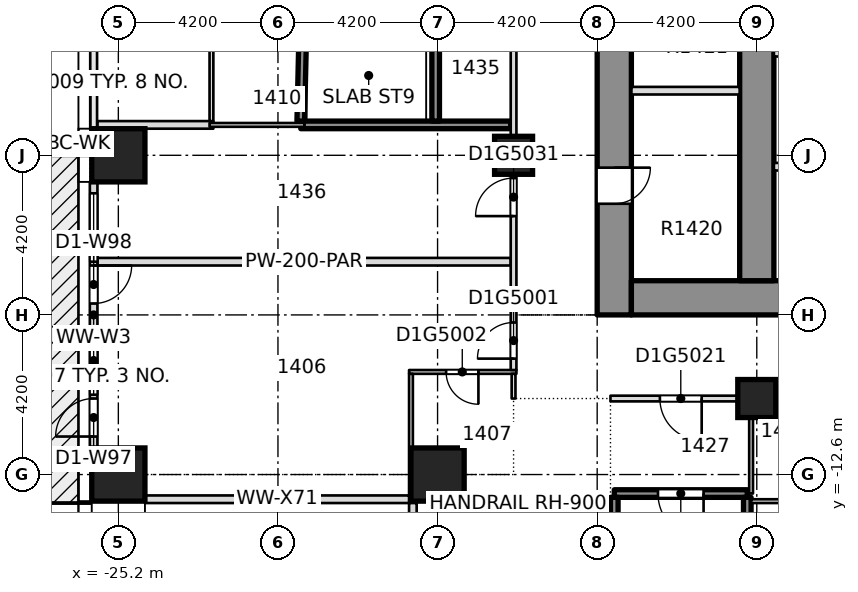
"""IFC4 building model, lengths in metres.
Left out: names, types, materials, properties, quantities, classifications, styles, units other than length and angle.
Written with IfcOpenShell. Run it as: python <this file> out.ifc"""

import sys

from ifc_helpers import new_model, si_unit, direction, frame, frame_2d, origin, origin_2d, place, context, subcontext, project, spatial, rectangle, extrude, element, fill, save


model = new_model("IFC4")
c1 = context("Model", 3, precision=1e-05, world=origin(), true_north=direction((0.0, 1.0)))
c2 = subcontext(c1, "Body", "Model", "MODEL_VIEW")
j1 = project(units=[si_unit("LENGTHUNIT", "METRE"), si_unit("PLANEANGLEUNIT", "RADIAN")], contexts=[c1])
p1 = place(None, origin())
s1 = spatial("IfcSite", under=j1, at=p1, CompositionType="ELEMENT")
p2 = place(p1, origin())
s2 = spatial("IfcBuilding", under=s1, at=p2, CompositionType="ELEMENT")
p3 = place(p2, frame((0.0, 0.0, 62.1)))
s3 = spatial("IfcBuildingStorey", under=s2, at=p3, CompositionType="ELEMENT", Elevation=62.1)
p4 = place(p3, frame((-12.15, -8.4, -0.32), z_axis=(0.0, 0.0, 1.0), x_axis=(0.0, 1.0, 0.0)))
e1 = element("IfcWall", 1, at=p4, inside=s3, PredefinedType="SHEAR", context=c2, shape_type="SweptSolid", body=[
    extrude(rectangle(XDim=30.15, YDim=0.9, at=frame_2d((15.075, 0.0))), origin(), (0.0, 0.0, 1.0), 3.45),
])
p5 = place(p4, frame((2.925, 0.0, 0.32)))
e2 = element("IfcOpeningElement", 2, at=p5, cuts=e1, PredefinedType="OPENING", context=c2, shape_type="SweptSolid", body=[
    extrude(rectangle(XDim=0.95, YDim=2.1, at=frame_2d((0.475, 1.05))), frame((0.0, 0.46, 0.0), z_axis=(0.0, -1.0, 0.0), x_axis=(1.0, 0.0, 0.0)), (0.0, 0.0, 1.0), 0.92),
])
p6 = place(p4, frame((7.025, 0.0, 0.32)))
e3 = element("IfcOpeningElement", 3, at=p6, cuts=e1, PredefinedType="OPENING", context=c2, shape_type="SweptSolid", body=[
    extrude(rectangle(XDim=0.95, YDim=2.1, at=frame_2d((0.475, 1.05))), frame((0.0, 0.46, 0.0), z_axis=(0.0, -1.0, 0.0), x_axis=(1.0, 0.0, 0.0)), (0.0, 0.0, 1.0), 0.92),
])
p7 = place(p4, frame((10.875, 0.0, 0.32)))
e4 = element("IfcOpeningElement", 4, at=p7, cuts=e1, PredefinedType="OPENING", context=c2, shape_type="SweptSolid", body=[
    extrude(rectangle(XDim=0.95, YDim=2.1, at=frame_2d((0.475, 1.05))), frame((0.0, 0.46, 0.0), z_axis=(0.0, -1.0, 0.0), x_axis=(1.0, 0.0, 0.0)), (0.0, 0.0, 1.0), 0.92),
])
p8 = place(p4, frame((15.625, 0.0, 0.32)))
e5 = element("IfcOpeningElement", 5, at=p8, cuts=e1, PredefinedType="OPENING", context=c2, shape_type="SweptSolid", body=[
    extrude(rectangle(XDim=0.95, YDim=2.1, at=frame_2d((0.475, 1.05))), frame((0.0, 0.46, 0.0), z_axis=(0.0, -1.0, 0.0), x_axis=(1.0, 0.0, 0.0)), (0.0, 0.0, 1.0), 0.92),
])
p9 = place(p4, frame((24.75, 0.0, 0.32)))
e6 = element("IfcOpeningElement", 6, at=p9, cuts=e1, PredefinedType="OPENING", context=c2, shape_type="SweptSolid", body=[
    extrude(rectangle(XDim=0.95, YDim=2.1, at=frame_2d((0.475, 1.05))), frame((0.0, 0.46, 0.0), z_axis=(0.0, -1.0, 0.0), x_axis=(1.0, 0.0, 0.0)), (0.0, 0.0, 1.0), 0.92),
])
p10 = place(p4, frame((19.3, 0.0, 0.32)))
e7 = element("IfcOpeningElement", 7, at=p10, cuts=e1, PredefinedType="OPENING", context=c2, shape_type="SweptSolid", body=[
    extrude(rectangle(XDim=1.2, YDim=2.1, at=frame_2d((0.6, 1.05))), frame((0.0, 0.46, 0.0), z_axis=(0.0, -1.0, 0.0), x_axis=(1.0, 0.0, 0.0)), (0.0, 0.0, 1.0), 0.92),
])
p11 = place(p3, frame((-11.7, -7.95, -0.32), z_axis=(0.0, 0.0, 1.0), x_axis=(1.0, 0.0, 0.0)))
e8 = element("IfcWall", 8, at=p11, inside=s3, PredefinedType="SHEAR", context=c2, shape_type="SweptSolid", body=[
    extrude(rectangle(XDim=23.4, YDim=0.9, at=frame_2d((11.7, 0.0))), origin(), (0.0, 0.0, 1.0), 3.45),
])
p12 = place(p11, frame((6.95, 0.0, 0.32)))
e9 = element("IfcOpeningElement", 9, at=p12, cuts=e8, PredefinedType="OPENING", context=c2, shape_type="SweptSolid", body=[
    extrude(rectangle(XDim=1.8, YDim=2.1, at=frame_2d((0.9, 1.05))), frame((0.0, 0.46, 0.0), z_axis=(0.0, -1.0, 0.0), x_axis=(1.0, 0.0, 0.0)), (0.0, 0.0, 1.0), 0.92),
])
p13 = place(p11, frame((14.65, 0.0, 0.32)))
e10 = element("IfcOpeningElement", 10, at=p13, cuts=e8, PredefinedType="OPENING", context=c2, shape_type="SweptSolid", body=[
    extrude(rectangle(XDim=1.8, YDim=2.1, at=frame_2d((0.9, 1.05))), frame((0.0, 0.46, 0.0), z_axis=(0.0, -1.0, 0.0), x_axis=(1.0, 0.0, 0.0)), (0.0, 0.0, 1.0), 0.92),
])
p14 = place(p3, frame((-8.4, -7.5, -0.32), z_axis=(0.0, 0.0, 1.0), x_axis=(0.0, 1.0, 0.0)))
e11 = element("IfcWall", 11, at=p14, inside=s3, PredefinedType="SHEAR", context=c2, shape_type="SweptSolid", body=[
    extrude(rectangle(XDim=28.35, YDim=0.9, at=frame_2d((14.175, 0.0))), origin(), (0.0, 0.0, 1.0), 3.45),
])
p15 = place(p14, frame((18.4, 0.0, 0.32)))
e12 = element("IfcOpeningElement", 12, at=p15, cuts=e11, PredefinedType="OPENING", context=c2, shape_type="SweptSolid", body=[
    extrude(rectangle(XDim=1.2, YDim=2.1, at=frame_2d((0.6, 1.05))), frame((0.0, 0.46, 0.0), z_axis=(0.0, -1.0, 0.0), x_axis=(1.0, 0.0, 0.0)), (0.0, 0.0, 1.0), 0.92),
])
for number, where, z_axis, x_axis in (
    (13, (-25.2, -12.6, -0.32), (0.0, 0.0, 1.0), (1.0, 0.0, 0.0)),
    (14, (-16.8, -12.6, -0.32), (0.0, 0.0, 1.0), (1.0, 0.0, 0.0)),
    (15, (-25.2, -4.2, -0.32), (0.0, 0.0, 1.0), (1.0, 0.0, 0.0)),
):
    element("IfcColumn", number, at=place(p3, frame(where, z_axis=z_axis, x_axis=x_axis)), inside=s3, PredefinedType="COLUMN", context=c2, shape_type="SweptSolid", body=[
        extrude(rectangle(XDim=1.4, YDim=1.4, at=origin_2d()), origin(), (0.0, 0.0, 1.0), 3.45),
    ])
for number, where, z_axis, x_axis in (
    (16, (-8.4, -10.6, -0.32), (0.0, 0.0, 1.0), (1.0, 0.0, 0.0)),
    (17, (-14.8, -4.2, -0.32), (0.0, 0.0, 1.0), (1.0, 0.0, 0.0)),
):
    element("IfcColumn", number, at=place(p3, frame(where, z_axis=z_axis, x_axis=x_axis)), inside=s3, PredefinedType="COLUMN", context=c2, shape_type="SweptSolid", body=[
        extrude(rectangle(XDim=1.0, YDim=1.0, at=origin_2d()), origin(), (0.0, 0.0, 1.0), 3.45),
    ])
p16 = place(p3, frame((-8.55, -13.3, 0.0), z_axis=(0.0, 0.0, 1.0), x_axis=(1.0, 0.0, 0.0)))
e18 = element("IfcWall", 18, at=p16, inside=s3, PredefinedType="PARTITIONING", context=c2, shape_type="SweptSolid", body=[
    extrude(rectangle(XDim=2.45, YDim=0.1, at=frame_2d((1.225, 0.0))), origin(), (0.0, 0.0, 1.0), 3.13),
])
p17 = place(p16, frame((1.35, 0.0, 0.0)))
e19 = element("IfcOpeningElement", 19, at=p17, cuts=e18, PredefinedType="OPENING", context=c2, shape_type="SweptSolid", body=[
    extrude(rectangle(XDim=0.85, YDim=2.1, at=frame_2d((0.425, 1.05))), frame((0.0, 0.06, 0.0), z_axis=(0.0, -1.0, 0.0), x_axis=(1.0, 0.0, 0.0)), (0.0, 0.0, 1.0), 0.12),
])
p18 = place(p3, frame((-12.15, -13.1, 0.0), z_axis=(0.0, 0.0, 1.0), x_axis=(1.0, 0.0, 0.0)))
e20 = element("IfcWall", 20, at=p18, inside=s3, PredefinedType="SOLIDWALL", context=c2, shape_type="SweptSolid", body=[
    extrude(rectangle(XDim=3.5, YDim=0.2, at=frame_2d((1.75, 0.0))), origin(), (0.0, 0.0, 1.0), 3.13),
])
p19 = place(p18, frame((1.15, 0.0, 0.0)))
e21 = element("IfcOpeningElement", 21, at=p19, cuts=e20, PredefinedType="OPENING", context=c2, shape_type="SweptSolid", body=[
    extrude(rectangle(XDim=1.2, YDim=2.1, at=frame_2d((0.6, 1.05))), frame((0.0, 0.11, 0.0), z_axis=(0.0, -1.0, 0.0), x_axis=(1.0, 0.0, 0.0)), (0.0, 0.0, 1.0), 0.22),
])
p20 = place(p3, frame((-12.25, -10.6, 0.0), z_axis=(0.0, 0.0, 1.0), x_axis=(1.0, 0.0, 0.0)))
e22 = element("IfcWall", 22, at=p20, inside=s3, PredefinedType="PARTITIONING", context=c2, shape_type="SweptSolid", body=[
    extrude(rectangle(XDim=3.75, YDim=0.15, at=frame_2d((1.875, 0.0))), origin(), (0.0, 0.0, 1.0), 3.13),
])
p21 = place(p20, frame((1.3, 0.0, 0.0)))
e23 = element("IfcOpeningElement", 23, at=p21, cuts=e22, PredefinedType="OPENING", context=c2, shape_type="SweptSolid", body=[
    extrude(rectangle(XDim=1.1, YDim=2.1, at=frame_2d((0.55, 1.05))), frame((0.0, 0.085, 0.0), z_axis=(0.0, -1.0, 0.0), x_axis=(1.0, 0.0, 0.0)), (0.0, 0.0, 1.0), 0.17),
])
p22 = place(p3, frame((-8.6, -10.6, 0.0), z_axis=(0.0, 0.0, 1.0), x_axis=(1.0, 0.0, 0.0)))
e24 = element("IfcWall", 24, at=p22, inside=s3, PredefinedType="PARTITIONING", context=c2, shape_type="SweptSolid", body=[
    extrude(rectangle(XDim=2.5, YDim=0.1, at=frame_2d((1.25, 0.0))), origin(), (0.0, 0.0, 1.0), 3.13),
])
p23 = place(p3, frame((-17.55, -9.9, 0.0), z_axis=(0.0, 0.0, 1.0), x_axis=(1.0, 0.0, 0.0)))
e25 = element("IfcWall", 25, at=p23, inside=s3, PredefinedType="PARTITIONING", context=c2, shape_type="SweptSolid", body=[
    extrude(rectangle(XDim=2.825, YDim=0.1, at=frame_2d((1.413, 0.0))), origin(), (0.0, 0.0, 1.0), 3.13),
])
p24 = place(p23, frame((0.975, 0.0, 0.0)))
e26 = element("IfcOpeningElement", 26, at=p24, cuts=e25, PredefinedType="OPENING", context=c2, shape_type="SweptSolid", body=[
    extrude(rectangle(XDim=0.85, YDim=2.1, at=frame_2d((0.425, 1.05))), frame((0.0, 0.06, 0.0), z_axis=(0.0, -1.0, 0.0), x_axis=(1.0, 0.0, 0.0)), (0.0, 0.0, 1.0), 0.12),
])
p25 = place(p3, frame((-25.75, -7.0, 0.0), z_axis=(0.0, 0.0, 1.0), x_axis=(1.0, 0.0, 0.0)))
e27 = element("IfcWall", 27, at=p25, inside=s3, PredefinedType="PARTITIONING", context=c2, shape_type="SweptSolid", body=[
    extrude(rectangle(XDim=10.875, YDim=0.2, at=frame_2d((5.438, 0.0))), origin(), (0.0, 0.0, 1.0), 3.13),
])
p26 = place(p3, frame((-25.75, -3.4, 0.0), z_axis=(0.0, 0.0, 1.0), x_axis=(1.0, 0.0, 0.0)))
e28 = element("IfcWall", 28, at=p26, inside=s3, PredefinedType="PARTITIONING", context=c2, shape_type="SweptSolid", body=[
    extrude(rectangle(XDim=3.05, YDim=0.2, at=frame_2d((1.525, 0.0))), origin(), (0.0, 0.0, 1.0), 3.13),
])
p27 = place(p3, frame((-22.8, -3.4, 0.0), z_axis=(0.0, 0.0, 1.0), x_axis=(1.0, 0.0, 0.0)))
e29 = element("IfcWall", 29, at=p27, inside=s3, PredefinedType="PARTITIONING", context=c2, shape_type="SweptSolid", body=[
    extrude(rectangle(XDim=2.5, YDim=0.1, at=frame_2d((1.25, 0.0))), origin(), (0.0, 0.0, 1.0), 3.13),
])
p28 = place(p3, frame((-20.4, -3.4, 0.0), z_axis=(0.0, 0.0, 1.0), x_axis=(1.0, 0.0, 0.0)))
e30 = element("IfcWall", 30, at=p28, inside=s3, PredefinedType="SOLIDWALL", context=c2, shape_type="SweptSolid", body=[
    extrude(rectangle(XDim=5.525, YDim=0.2, at=frame_2d((2.762, 0.0))), origin(), (0.0, 0.0, 1.0), 3.13),
])
p29 = place(p3, frame((-22.75, -3.3, 0.0), z_axis=(0.0, 0.0, 1.0), x_axis=(0.0, 1.0, 0.0)))
e31 = element("IfcWall", 31, at=p29, inside=s3, PredefinedType="PARTITIONING", context=c2, shape_type="SweptSolid", body=[
    extrude(rectangle(XDim=2.25, YDim=0.1, at=frame_2d((1.125, 0.0))), origin(), (0.0, 0.0, 1.0), 3.13),
])
p30 = place(p3, frame((-20.4, -3.3, 0.0), z_axis=(0.0, 0.0, 1.0), x_axis=(0.022687568549, 0.99974260399, 0.0)))
e32 = element("IfcWall", 32, at=p30, inside=s3, PredefinedType="SOLIDWALL", context=c2, shape_type="SweptSolid", body=[
    extrude(rectangle(XDim=2.131, YDim=0.2, at=frame_2d((1.065, 0.0))), origin(), (0.0, 0.0, 1.0), 3.13),
])
p31 = place(p3, frame((-17.5, -13.35, 0.0), z_axis=(0.0, 0.0, 1.0), x_axis=(0.0, 1.0, 0.0)))
e33 = element("IfcWall", 33, at=p31, inside=s3, PredefinedType="PARTITIONING", context=c2, shape_type="SweptSolid", body=[
    extrude(rectangle(XDim=3.4, YDim=0.1, at=frame_2d((1.7, 0.0))), origin(), (0.0, 0.0, 1.0), 3.13),
])
p32 = place(p3, frame((-16.85, -3.3, 0.0), z_axis=(0.0, 0.0, 1.0), x_axis=(0.0, 1.0, 0.0)))
e34 = element("IfcWall", 34, at=p32, inside=s3, PredefinedType="SOLIDWALL", context=c2, shape_type="SweptSolid", body=[
    extrude(rectangle(XDim=6.6, YDim=0.2, at=frame_2d((3.3, 0.0))), origin(), (0.0, 0.0, 1.0), 3.13),
])
p33 = place(p32, frame((5.1, 0.0, 0.0)))
e35 = element("IfcOpeningElement", 35, at=p33, cuts=e34, PredefinedType="OPENING", context=c2, shape_type="SweptSolid", body=[
    extrude(rectangle(XDim=1.2, YDim=2.1, at=frame_2d((0.6, 1.05))), frame((0.0, 0.11, 0.0), z_axis=(0.0, -1.0, 0.0), x_axis=(1.0, 0.0, 0.0)), (0.0, 0.0, 1.0), 0.22),
])
p34 = place(p3, frame((-14.8, -10.6, 0.0), z_axis=(0.0, 0.0, 1.0), x_axis=(0.0, 1.0, 0.0)))
e36 = element("IfcWall", 36, at=p34, inside=s3, PredefinedType="PARTITIONING", context=c2, shape_type="SweptSolid", body=[
    extrude(rectangle(XDim=0.65, YDim=0.1, at=frame_2d((0.325, 0.0))), origin(), (0.0, 0.0, 1.0), 3.13),
])
p35 = place(p3, frame((-14.8, -9.85, 0.0), z_axis=(0.0, 0.0, 1.0), x_axis=(0.0, 1.0, 0.0)))
e37 = element("IfcWall", 37, at=p35, inside=s3, PredefinedType="PARTITIONING", context=c2, shape_type="SweptSolid", body=[
    extrude(rectangle(XDim=18.175, YDim=0.15, at=frame_2d((9.087, 0.0))), origin(), (0.0, 0.0, 1.0), 3.13),
])
p36 = place(p35, frame((0.3, 0.0, 0.0)))
e38 = element("IfcOpeningElement", 38, at=p36, cuts=e37, PredefinedType="OPENING", context=c2, shape_type="SweptSolid", body=[
    extrude(rectangle(XDim=0.95, YDim=2.1, at=frame_2d((0.475, 1.05))), frame((0.0, 0.085, 0.0), z_axis=(0.0, -1.0, 0.0), x_axis=(1.0, 0.0, 0.0)), (0.0, 0.0, 1.0), 0.17),
])
p37 = place(p35, frame((9.3, 0.0, 0.0)))
e39 = element("IfcOpeningElement", 39, at=p37, cuts=e37, PredefinedType="OPENING", context=c2, shape_type="SweptSolid", body=[
    extrude(rectangle(XDim=1.1, YDim=2.1, at=frame_2d((0.55, 1.05))), frame((0.0, 0.085, 0.0), z_axis=(0.0, -1.0, 0.0), x_axis=(1.0, 0.0, 0.0)), (0.0, 0.0, 1.0), 0.17),
])
p38 = place(p35, frame((4.05, 0.0, 0.0)))
e40 = element("IfcOpeningElement", 40, at=p38, cuts=e37, PredefinedType="OPENING", context=c2, shape_type="SweptSolid", body=[
    extrude(rectangle(XDim=1.0, YDim=2.1, at=frame_2d((0.5, 1.05))), frame((0.0, 0.085, 0.0), z_axis=(0.0, -1.0, 0.0), x_axis=(1.0, 0.0, 0.0)), (0.0, 0.0, 1.0), 0.17),
])
p39 = place(p3, frame((-8.55, -13.1, 0.0), z_axis=(0.0, 0.0, 1.0), x_axis=(0.0, 1.0, 0.0)))
e41 = element("IfcWall", 41, at=p39, inside=s3, PredefinedType="PARTITIONING", context=c2, shape_type="SweptSolid", body=[
    extrude(rectangle(XDim=2.425, YDim=0.1, at=frame_2d((1.212, 0.0))), origin(), (0.0, 0.0, 1.0), 3.13),
])
p40 = place(p3, frame((-25.85, -4.9, 0.0), z_axis=(0.0, 0.0, 1.0), x_axis=(0.0, -1.0, 0.0)))
e42 = element("IfcWall", 42, at=p40, inside=s3, PredefinedType="STANDARD", context=c2, shape_type="SweptSolid", body=[
    extrude(rectangle(XDim=7.0, YDim=0.2, at=frame_2d((3.5, 0.0))), origin(), (0.0, 0.0, 1.0), 3.13),
])
p41 = place(p40, frame((3.8, 0.0, 0.2)))
e43 = element("IfcOpeningElement", 43, at=p41, cuts=e42, PredefinedType="OPENING", context=c2, shape_type="SweptSolid", body=[
    extrude(rectangle(XDim=1.8, YDim=2.65, at=frame_2d((0.9, 1.325))), frame((0.0, 0.11, 0.0), z_axis=(0.0, -1.0, 0.0), x_axis=(1.0, 0.0, 0.0)), (0.0, 0.0, 1.0), 0.22),
])
p42 = place(p40, frame((5.7, 0.0, 0.0)))
e44 = element("IfcOpeningElement", 44, at=p42, cuts=e42, PredefinedType="OPENING", context=c2, shape_type="SweptSolid", body=[
    extrude(rectangle(XDim=1.0, YDim=2.4, at=frame_2d((0.5, 1.2))), frame((0.0, 0.11, 0.0), z_axis=(0.0, -1.0, 0.0), x_axis=(1.0, 0.0, 0.0)), (0.0, 0.0, 1.0), 0.22),
])
p43 = place(p40, frame((0.3, 0.0, 0.2)))
e45 = element("IfcOpeningElement", 45, at=p43, cuts=e42, PredefinedType="OPENING", context=c2, shape_type="SweptSolid", body=[
    extrude(rectangle(XDim=1.8, YDim=2.65, at=frame_2d((0.9, 1.325))), frame((0.0, 0.11, 0.0), z_axis=(0.0, -1.0, 0.0), x_axis=(1.0, 0.0, 0.0)), (0.0, 0.0, 1.0), 0.22),
])
p44 = place(p40, frame((2.2, 0.0, 0.0)))
e46 = element("IfcOpeningElement", 46, at=p44, cuts=e42, PredefinedType="OPENING", context=c2, shape_type="SweptSolid", body=[
    extrude(rectangle(XDim=1.0, YDim=2.4, at=frame_2d((0.5, 1.2))), frame((0.0, 0.11, 0.0), z_axis=(0.0, -1.0, 0.0), x_axis=(1.0, 0.0, 0.0)), (0.0, 0.0, 1.0), 0.22),
])
p45 = place(p3, frame((-24.5, -13.25, 0.0), z_axis=(0.0, 0.0, 1.0), x_axis=(1.0, 0.0, 0.0)))
e47 = element("IfcWall", 47, at=p45, inside=s3, PredefinedType="STANDARD", context=c2, shape_type="SweptSolid", body=[
    extrude(rectangle(XDim=6.95, YDim=0.2, at=frame_2d((3.475, 0.0))), origin(), (0.0, 0.0, 1.0), 3.13),
])
p46 = place(p3, frame((-17.45, -13.35, 0.0), z_axis=(0.0, 0.0, 1.0), x_axis=(0.0, -1.0, 0.0)))
e48 = element("IfcWall", 48, at=p46, inside=s3, PredefinedType="STANDARD", context=c2, shape_type="SweptSolid", body=[
    extrude(rectangle(XDim=6.95, YDim=0.2, at=frame_2d((3.475, 0.0))), origin(), (0.0, 0.0, 1.0), 3.13),
])
p47 = place(p46, frame((3.75, 0.0, 0.2)))
e49 = element("IfcOpeningElement", 49, at=p47, cuts=e48, PredefinedType="OPENING", context=c2, shape_type="SweptSolid", body=[
    extrude(rectangle(XDim=1.8, YDim=2.65, at=frame_2d((0.9, 1.325))), frame((0.0, 0.11, 0.0), z_axis=(0.0, -1.0, 0.0), x_axis=(1.0, 0.0, 0.0)), (0.0, 0.0, 1.0), 0.22),
])
p48 = place(p46, frame((0.275, 0.0, 0.2)))
e50 = element("IfcOpeningElement", 50, at=p48, cuts=e48, PredefinedType="OPENING", context=c2, shape_type="SweptSolid", body=[
    extrude(rectangle(XDim=1.8, YDim=2.65, at=frame_2d((0.9, 1.325))), frame((0.0, 0.11, 0.0), z_axis=(0.0, -1.0, 0.0), x_axis=(1.0, 0.0, 0.0)), (0.0, 0.0, 1.0), 0.22),
])
for number, where, z_axis, x_axis in (
    (51, (-7.949, -4.5, 0.0), (0.0, 0.0, 1.0), (1.0, 0.0, 0.0)),
    (52, (-7.949, -1.5, 0.0), (0.0, 0.0, 1.0), (1.0, 0.0, 0.0)),
):
    element("IfcWall", number, at=place(p3, frame(where, z_axis=z_axis, x_axis=x_axis)), inside=s3, PredefinedType="PARTITIONING", context=c2, shape_type="SweptSolid", body=[
        extrude(rectangle(XDim=2.374, YDim=0.2, at=frame_2d((1.187, 0.0))), origin(), (0.0, 0.0, 1.0), 3.13),
    ])
p49 = place(p3, frame((-11.699, -2.5, 0.0), z_axis=(0.0, 0.0, 1.0), x_axis=(1.0, 0.0, 0.0)))
e53 = element("IfcWall", 53, at=p49, inside=s3, PredefinedType="PARTITIONING", context=c2, shape_type="SweptSolid", body=[
    extrude(rectangle(XDim=2.848, YDim=0.2, at=frame_2d((1.424, 0.0))), origin(), (0.0, 0.0, 1.0), 3.13),
])
p50 = place(p3, frame((-12.15, -19.8, 0.0), z_axis=(0.0, 0.0, 1.0), x_axis=(0.0, 1.0, 0.0)))
e54 = element("IfcWall", 54, at=p50, inside=s3, PredefinedType="SOLIDWALL", context=c2, shape_type="SweptSolid", body=[
    extrude(rectangle(XDim=6.6, YDim=0.2, at=frame_2d((3.3, 0.0))), origin(), (0.0, 0.0, 1.0), 3.13),
])
p51 = place(p3, frame((-8.65, -20.3, 0.0), z_axis=(0.0, 0.0, 1.0), x_axis=(0.0, 1.0, 0.0)))
e55 = element("IfcWall", 55, at=p51, inside=s3, PredefinedType="SOLIDWALL", context=c2, shape_type="SweptSolid", body=[
    extrude(rectangle(XDim=7.1, YDim=0.2, at=frame_2d((3.55, 0.0))), origin(), (0.0, 0.0, 1.0), 3.13),
])
p52 = place(p36, origin())
e56 = element("IfcDoor", 56, at=p52, inside=s3, OperationType="SINGLE_SWING_LEFT", PredefinedType="DOOR", context=c2, shape_type="SweptSolid", body=[
    extrude(rectangle(XDim=0.95, YDim=2.1, at=frame_2d((0.475, 1.05))), frame((0.0, 0.025, 0.0), z_axis=(0.0, -1.0, 0.0), x_axis=(1.0, 0.0, 0.0)), (0.0, 0.0, 1.0), 0.05),
])
fill(e38, e56)
p53 = place(p24, origin())
e57 = element("IfcDoor", 57, at=p53, inside=s3, OperationType="SINGLE_SWING_RIGHT", PredefinedType="DOOR", context=c2, shape_type="SweptSolid", body=[
    extrude(rectangle(XDim=0.85, YDim=2.1, at=frame_2d((0.425, 1.05))), frame((0.0, 0.025, 0.0), z_axis=(0.0, -1.0, 0.0), x_axis=(1.0, 0.0, 0.0)), (0.0, 0.0, 1.0), 0.05),
])
fill(e26, e57)
p54 = place(p21, origin())
e58 = element("IfcDoor", 58, at=p54, inside=s3, OperationType="SINGLE_SWING_RIGHT", PredefinedType="DOOR", context=c2, shape_type="SweptSolid", body=[
    extrude(rectangle(XDim=1.1, YDim=2.1, at=frame_2d((0.55, 1.05))), frame((0.0, 0.025, 0.0), z_axis=(0.0, -1.0, 0.0), x_axis=(1.0, 0.0, 0.0)), (0.0, 0.0, 1.0), 0.05),
])
fill(e23, e58)
p55 = place(p19, origin())
e59 = element("IfcDoor", 59, at=p55, inside=s3, OperationType="SINGLE_SWING_RIGHT", PredefinedType="DOOR", context=c2, shape_type="SweptSolid", body=[
    extrude(rectangle(XDim=1.2, YDim=2.1, at=frame_2d((0.6, 1.05))), frame((0.0, 0.025, 0.0), z_axis=(0.0, -1.0, 0.0), x_axis=(1.0, 0.0, 0.0)), (0.0, 0.0, 1.0), 0.05),
])
fill(e21, e59)
p56 = place(p38, origin())
e60 = element("IfcDoor", 60, at=p56, inside=s3, OperationType="SINGLE_SWING_LEFT", PredefinedType="DOOR", context=c2, shape_type="SweptSolid", body=[
    extrude(rectangle(XDim=1.0, YDim=2.1, at=frame_2d((0.5, 1.05))), frame((0.0, 0.025, 0.0), z_axis=(0.0, -1.0, 0.0), x_axis=(1.0, 0.0, 0.0)), (0.0, 0.0, 1.0), 0.05),
])
fill(e40, e60)
p57 = place(p41, origin())
e61 = element("IfcWindow", 61, at=p57, inside=s3, PartitioningType="SINGLE_PANEL", PredefinedType="WINDOW", context=c2, shape_type="SweptSolid", body=[
    extrude(rectangle(XDim=1.8, YDim=2.65, at=frame_2d((0.9, 1.325))), frame((0.0, 0.03, 0.0), z_axis=(0.0, -1.0, 0.0), x_axis=(1.0, 0.0, 0.0)), (0.0, 0.0, 1.0), 0.06),
])
fill(e43, e61)
p58 = place(p42, origin())
e62 = element("IfcDoor", 62, at=p58, inside=s3, OperationType="SINGLE_SWING_LEFT", PredefinedType="DOOR", context=c2, shape_type="SweptSolid", body=[
    extrude(rectangle(XDim=1.0, YDim=2.4, at=frame_2d((0.5, 1.2))), frame((0.0, 0.025, 0.0), z_axis=(0.0, -1.0, 0.0), x_axis=(1.0, 0.0, 0.0)), (0.0, 0.0, 1.0), 0.05),
])
fill(e44, e62)
p59 = place(p43, origin())
e63 = element("IfcWindow", 63, at=p59, inside=s3, PartitioningType="SINGLE_PANEL", PredefinedType="WINDOW", context=c2, shape_type="SweptSolid", body=[
    extrude(rectangle(XDim=1.8, YDim=2.65, at=frame_2d((0.9, 1.325))), frame((0.0, 0.03, 0.0), z_axis=(0.0, -1.0, 0.0), x_axis=(1.0, 0.0, 0.0)), (0.0, 0.0, 1.0), 0.06),
])
fill(e45, e63)
p60 = place(p44, origin())
e64 = element("IfcDoor", 64, at=p60, inside=s3, OperationType="SINGLE_SWING_LEFT", PredefinedType="DOOR", context=c2, shape_type="SweptSolid", body=[
    extrude(rectangle(XDim=1.0, YDim=2.4, at=frame_2d((0.5, 1.2))), frame((0.0, 0.025, 0.0), z_axis=(0.0, -1.0, 0.0), x_axis=(1.0, 0.0, 0.0)), (0.0, 0.0, 1.0), 0.05),
])
fill(e46, e64)
p61 = place(p5, origin())
e65 = element("IfcDoor", 65, at=p61, inside=s3, OperationType="SINGLE_SWING_LEFT", PredefinedType="DOOR", context=c2, shape_type="SweptSolid", body=[
    extrude(rectangle(XDim=0.95, YDim=2.1, at=frame_2d((0.475, 1.05))), frame((0.0, 0.025, 0.0), z_axis=(0.0, -1.0, 0.0), x_axis=(1.0, 0.0, 0.0)), (0.0, 0.0, 1.0), 0.05),
])
fill(e2, e65)
save(model, sys.argv[1])
